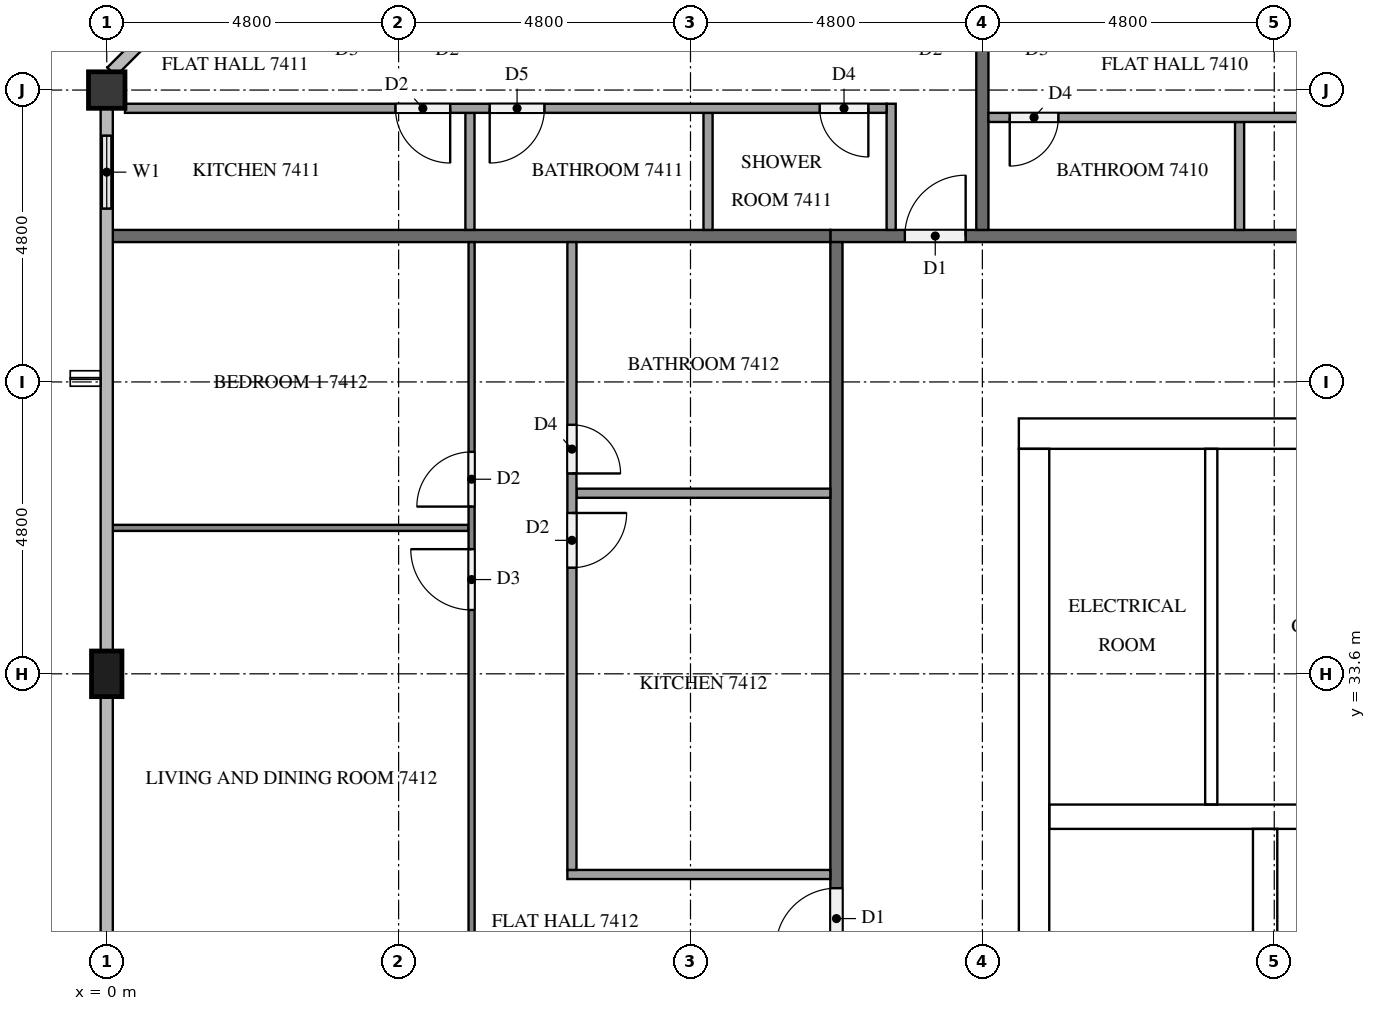
"""IFC4 building model, lengths in metres.
Left out: names, types, materials, properties, quantities, classifications, styles, units other than length and angle.
Written with IfcOpenShell. Run it as: python <this file> out.ifc"""

import sys

from ifc_helpers import new_model, si_unit, direction, frame, frame_2d, origin, origin_2d, place, context, subcontext, project, spatial, rectangle, extrude, element, fill, save


model = new_model("IFC4")
c1 = context("Model", 3, precision=1e-05, world=origin(), true_north=direction((0.0, 1.0)))
c2 = subcontext(c1, "Body", "Model", "MODEL_VIEW")
j1 = project(units=[si_unit("LENGTHUNIT", "METRE"), si_unit("PLANEANGLEUNIT", "RADIAN")], contexts=[c1])
p1 = place(None, origin())
s1 = spatial("IfcSite", under=j1, at=p1, CompositionType="ELEMENT")
p2 = place(p1, origin())
s2 = spatial("IfcBuilding", under=s1, at=p2, CompositionType="ELEMENT")
p3 = place(p2, frame((0.0, 0.0, 282.6)))
s3 = spatial("IfcBuildingStorey", under=s2, at=p3, CompositionType="ELEMENT", Elevation=282.6)
p4 = place(p3, frame((15.0, 37.55, 0.0), z_axis=(0.0, 0.0, 1.0), x_axis=(1.0, 0.0, 0.0)))
e1 = element("IfcWall", 1, at=p4, inside=s3, PredefinedType="SHEAR", context=c2, shape_type="SweptSolid", body=[
    extrude(rectangle(XDim=32.4, YDim=0.5, at=frame_2d((16.2, 0.0))), origin(), (0.0, 0.0, 1.0), 3.2),
])
p5 = place(p4, frame((15.3, 0.0, 0.0)))
e2 = element("IfcOpeningElement", 2, at=p5, cuts=e1, PredefinedType="OPENING", context=c2, shape_type="SweptSolid", body=[
    extrude(rectangle(XDim=1.8, YDim=2.1, at=frame_2d((0.9, 1.05))), frame((0.0, 0.26, 0.0), z_axis=(0.0, -1.0, 0.0), x_axis=(1.0, 0.0, 0.0)), (0.0, 0.0, 1.0), 0.52),
])
p6 = place(p4, frame((1.282, 0.0, 0.0)))
e3 = element("IfcOpeningElement", 3, at=p6, cuts=e1, PredefinedType="OPENING", context=c2, shape_type="SweptSolid", body=[
    extrude(rectangle(XDim=1.0, YDim=2.1, at=frame_2d((0.5, 1.05))), frame((0.0, 0.26, 0.0), z_axis=(0.0, -1.0, 0.0), x_axis=(1.0, 0.0, 0.0)), (0.0, 0.0, 1.0), 0.52),
])
p7 = place(p4, frame((5.082, 0.0, 0.0)))
e4 = element("IfcOpeningElement", 4, at=p7, cuts=e1, PredefinedType="OPENING", context=c2, shape_type="SweptSolid", body=[
    extrude(rectangle(XDim=1.0, YDim=2.1, at=frame_2d((0.5, 1.05))), frame((0.0, 0.26, 0.0), z_axis=(0.0, -1.0, 0.0), x_axis=(1.0, 0.0, 0.0)), (0.0, 0.0, 1.0), 0.52),
])
p8 = place(p3, frame((15.25, 15.5, 0.0), z_axis=(0.0, 0.0, 1.0), x_axis=(0.0, 1.0, 0.0)))
e5 = element("IfcWall", 5, at=p8, inside=s3, PredefinedType="SHEAR", context=c2, shape_type="SweptSolid", body=[
    extrude(rectangle(XDim=21.8, YDim=0.5, at=frame_2d((10.9, 0.0))), origin(), (0.0, 0.0, 1.0), 3.2),
])
p9 = place(p8, frame((5.26, 0.0, 0.0)))
e6 = element("IfcOpeningElement", 6, at=p9, cuts=e5, PredefinedType="OPENING", context=c2, shape_type="SweptSolid", body=[
    extrude(rectangle(XDim=1.2, YDim=2.1, at=frame_2d((0.6, 1.05))), frame((0.0, 0.26, 0.0), z_axis=(0.0, -1.0, 0.0), x_axis=(1.0, 0.0, 0.0)), (0.0, 0.0, 1.0), 0.52),
])
p10 = place(p3, frame((19.05, 15.5, 0.0), z_axis=(0.0, 0.0, 1.0), x_axis=(0.0, 1.0, 0.0)))
e7 = element("IfcWall", 7, at=p10, inside=s3, PredefinedType="SHEAR", context=c2, shape_type="SweptSolid", body=[
    extrude(rectangle(XDim=15.55, YDim=0.4, at=frame_2d((7.775, 0.0))), origin(), (0.0, 0.0, 1.0), 3.2),
])
p11 = place(p10, frame((9.95, 0.0, 0.0)))
e8 = element("IfcOpeningElement", 8, at=p11, cuts=e7, PredefinedType="OPENING", context=c2, shape_type="SweptSolid", body=[
    extrude(rectangle(XDim=1.1, YDim=2.1, at=frame_2d((0.55, 1.05))), frame((0.0, 0.21, 0.0), z_axis=(0.0, -1.0, 0.0), x_axis=(1.0, 0.0, 0.0)), (0.0, 0.0, 1.0), 0.42),
])
p12 = place(p10, frame((13.45, 0.0, 0.0)))
e9 = element("IfcOpeningElement", 9, at=p12, cuts=e7, PredefinedType="OPENING", context=c2, shape_type="SweptSolid", body=[
    extrude(rectangle(XDim=1.1, YDim=2.1, at=frame_2d((0.55, 1.05))), frame((0.0, 0.21, 0.0), z_axis=(0.0, -1.0, 0.0), x_axis=(1.0, 0.0, 0.0)), (0.0, 0.0, 1.0), 0.42),
])
p13 = place(p10, frame((0.7, 0.0, 0.0)))
e10 = element("IfcOpeningElement", 10, at=p13, cuts=e7, PredefinedType="OPENING", context=c2, shape_type="SweptSolid", body=[
    extrude(rectangle(XDim=1.2, YDim=2.1, at=frame_2d((0.6, 1.05))), frame((0.0, 0.21, 0.0), z_axis=(0.0, -1.0, 0.0), x_axis=(1.0, 0.0, 0.0)), (0.0, 0.0, 1.0), 0.42),
])
p14 = place(p3, frame((15.5, 31.25, 0.0), z_axis=(0.0, 0.0, 1.0), x_axis=(1.0, 0.0, 0.0)))
e11 = element("IfcWall", 11, at=p14, inside=s3, PredefinedType="SHEAR", context=c2, shape_type="SweptSolid", body=[
    extrude(rectangle(XDim=7.4, YDim=0.4, at=frame_2d((3.7, 0.0))), origin(), (0.0, 0.0, 1.0), 3.2),
])
p15 = place(p3, frame((0.0, 43.2, 0.0), z_axis=(0.0, 0.0, 1.0), x_axis=(1.0, 0.0, 0.0)))
e12 = element("IfcColumn", 12, at=p15, inside=s3, PredefinedType="COLUMN", context=c2, shape_type="SweptSolid", body=[
    extrude(rectangle(XDim=0.6, YDim=0.6, at=origin_2d()), origin(), (0.0, 0.0, 1.0), 3.2),
])
p16 = place(p3, frame((0.0, 33.6, 0.0), z_axis=(0.0, 0.0, 1.0), x_axis=(0.0, 1.0, 0.0)))
e13 = element("IfcColumn", 13, at=p16, inside=s3, PredefinedType="COLUMN", context=c2, shape_type="SweptSolid", body=[
    extrude(rectangle(XDim=0.75, YDim=0.5, at=origin_2d()), origin(), (0.0, 0.0, 1.0), 3.2),
])
p17 = place(p3, frame((0.0, 42.9, 0.0), z_axis=(0.0, 0.0, 1.0), x_axis=(0.0, -1.0, 0.0)))
e14 = element("IfcWall", 14, at=p17, inside=s3, PredefinedType="SOLIDWALL", context=c2, shape_type="SweptSolid", body=[
    extrude(rectangle(XDim=2.1, YDim=0.15, at=frame_2d((1.05, 0.0))), origin(), (0.0, 0.0, 1.0), 3.2),
])
p18 = place(p17, frame((0.45, 0.0, 0.9)))
e15 = element("IfcOpeningElement", 15, at=p18, cuts=e14, PredefinedType="OPENING", context=c2, shape_type="SweptSolid", body=[
    extrude(rectangle(XDim=1.2, YDim=1.4, at=frame_2d((0.6, 0.7))), frame((0.0, 0.085, 0.0), z_axis=(0.0, -1.0, 0.0), x_axis=(1.0, 0.0, 0.0)), (0.0, 0.0, 1.0), 0.17),
])
p19 = place(p3, frame((18.164, 31.45, 0.0), z_axis=(0.0, 0.0, 1.0), x_axis=(0.0, 1.0, 0.0)))
e16 = element("IfcWall", 16, at=p19, inside=s3, PredefinedType="PARTITIONING", context=c2, shape_type="SweptSolid", body=[
    extrude(rectangle(XDim=5.85, YDim=0.2, at=frame_2d((2.925, 0.0))), origin(), (0.0, 0.0, 1.0), 3.2),
])
p20 = place(p3, frame((11.9, 40.8, 0.0), z_axis=(0.0, 0.0, 1.0), x_axis=(1.0, 0.0, 0.0)))
e17 = element("IfcWall", 17, at=p20, inside=s3, PredefinedType="PARTITIONING", context=c2, shape_type="SweptSolid", body=[
    extrude(rectangle(XDim=38.6, YDim=0.2, at=frame_2d((19.3, 0.0))), origin(), (0.0, 0.0, 1.0), 3.2),
])
p21 = place(p20, frame((33.975, 0.0, 0.0)))
e18 = element("IfcOpeningElement", 18, at=p21, cuts=e17, PredefinedType="OPENING", context=c2, shape_type="SweptSolid", body=[
    extrude(rectangle(XDim=1.0, YDim=2.1, at=frame_2d((0.5, 1.05))), frame((0.0, 0.11, 0.0), z_axis=(0.0, -1.0, 0.0), x_axis=(1.0, 0.0, 0.0)), (0.0, 0.0, 1.0), 0.22),
])
p22 = place(p20, frame((14.725, 0.0, 0.0)))
e19 = element("IfcOpeningElement", 19, at=p22, cuts=e17, PredefinedType="OPENING", context=c2, shape_type="SweptSolid", body=[
    extrude(rectangle(XDim=1.1, YDim=2.1, at=frame_2d((0.55, 1.05))), frame((0.0, 0.11, 0.0), z_axis=(0.0, -1.0, 0.0), x_axis=(1.0, 0.0, 0.0)), (0.0, 0.0, 1.0), 0.22),
])
p23 = place(p20, frame((13.225, 0.0, 0.0)))
e20 = element("IfcOpeningElement", 20, at=p23, cuts=e17, PredefinedType="OPENING", context=c2, shape_type="SweptSolid", body=[
    extrude(rectangle(XDim=1.0, YDim=2.1, at=frame_2d((0.5, 1.05))), frame((0.0, 0.11, 0.0), z_axis=(0.0, -1.0, 0.0), x_axis=(1.0, 0.0, 0.0)), (0.0, 0.0, 1.0), 0.22),
])
p24 = place(p20, frame((1.225, 0.0, 0.0)))
e21 = element("IfcOpeningElement", 21, at=p24, cuts=e17, PredefinedType="OPENING", context=c2, shape_type="SweptSolid", body=[
    extrude(rectangle(XDim=1.0, YDim=2.1, at=frame_2d((0.5, 1.05))), frame((0.0, 0.11, 0.0), z_axis=(0.0, -1.0, 0.0), x_axis=(1.0, 0.0, 0.0)), (0.0, 0.0, 1.0), 0.22),
])
p25 = place(p3, frame((12.0, 12.1, 0.0), z_axis=(0.0, 0.0, 1.0), x_axis=(0.0, 1.0, 0.0)))
e22 = element("IfcWall", 22, at=p25, inside=s3, PredefinedType="PARTITIONING", context=c2, shape_type="SweptSolid", body=[
    extrude(rectangle(XDim=28.6, YDim=0.2, at=frame_2d((14.3, 0.0))), origin(), (0.0, 0.0, 1.0), 3.2),
])
p26 = place(p25, frame((16.975, 0.0, 0.0)))
e23 = element("IfcOpeningElement", 23, at=p26, cuts=e22, PredefinedType="OPENING", context=c2, shape_type="SweptSolid", body=[
    extrude(rectangle(XDim=1.0, YDim=2.1, at=frame_2d((0.5, 1.05))), frame((0.0, 0.11, 0.0), z_axis=(0.0, -1.0, 0.0), x_axis=(1.0, 0.0, 0.0)), (0.0, 0.0, 1.0), 0.22),
])
p27 = place(p25, frame((0.175, 0.0, 0.0)))
e24 = element("IfcOpeningElement", 24, at=p27, cuts=e22, PredefinedType="OPENING", context=c2, shape_type="SweptSolid", body=[
    extrude(rectangle(XDim=1.0, YDim=2.1, at=frame_2d((0.5, 1.05))), frame((0.0, 0.11, 0.0), z_axis=(0.0, -1.0, 0.0), x_axis=(1.0, 0.0, 0.0)), (0.0, 0.0, 1.0), 0.22),
])
p28 = place(p3, frame((14.4, 47.75, 0.0), z_axis=(0.0, 0.0, 1.0), x_axis=(0.0, -1.0, 0.0)))
e25 = element("IfcWall", 25, at=p28, inside=s3, PredefinedType="PARTITIONING", context=c2, shape_type="SweptSolid", body=[
    extrude(rectangle(XDim=6.85, YDim=0.2, at=frame_2d((3.425, 0.0))), origin(), (0.0, 0.0, 1.0), 3.2),
])
p29 = place(p3, frame((0.1, 40.8, 0.0), z_axis=(0.0, 0.0, 1.0), x_axis=(1.0, 0.0, 0.0)))
e26 = element("IfcWall", 26, at=p29, inside=s3, PredefinedType="PARTITIONING", context=c2, shape_type="SweptSolid", body=[
    extrude(rectangle(XDim=11.8, YDim=0.2, at=frame_2d((5.9, 0.0))), origin(), (0.0, 0.0, 1.0), 3.2),
])
p30 = place(p3, frame((18.63, 40.9, 0.0), z_axis=(0.0, 0.0, 1.0), x_axis=(0.0, 1.0, 0.0)))
e27 = element("IfcWall", 27, at=p30, inside=s3, PredefinedType="PARTITIONING", context=c2, shape_type="SweptSolid", body=[
    extrude(rectangle(XDim=1.775, YDim=0.15, at=frame_2d((0.888, 0.0))), origin(), (0.0, 0.0, 1.0), 3.2),
])
p31 = place(p3, frame((24.825, 42.75, 0.0), z_axis=(0.0, 0.0, 1.0), x_axis=(-1.0, 0.0, 0.0)))
e28 = element("IfcWall", 28, at=p31, inside=s3, PredefinedType="PARTITIONING", context=c2, shape_type="SweptSolid", body=[
    extrude(rectangle(XDim=10.325, YDim=0.15, at=frame_2d((5.163, 0.0))), origin(), (0.0, 0.0, 1.0), 3.2),
])
p32 = place(p31, frame((0.3, 0.0, 0.0)))
e29 = element("IfcOpeningElement", 29, at=p32, cuts=e28, PredefinedType="OPENING", context=c2, shape_type="SweptSolid", body=[
    extrude(rectangle(XDim=0.9, YDim=2.1, at=frame_2d((0.45, 1.05))), frame((0.0, 0.085, 0.0), z_axis=(0.0, -1.0, 0.0), x_axis=(1.0, 0.0, 0.0)), (0.0, 0.0, 1.0), 0.17),
])
p33 = place(p31, frame((9.175, 0.0, 0.0)))
e30 = element("IfcOpeningElement", 30, at=p33, cuts=e28, PredefinedType="OPENING", context=c2, shape_type="SweptSolid", body=[
    extrude(rectangle(XDim=0.8, YDim=2.1, at=frame_2d((0.4, 1.05))), frame((0.0, 0.085, 0.0), z_axis=(0.0, -1.0, 0.0), x_axis=(1.0, 0.0, 0.0)), (0.0, 0.0, 1.0), 0.17),
])
for number, where, z_axis, x_axis in (
    (31, (9.888, 40.9, 0.0), (0.0, 0.0, 1.0), (0.0, 1.0, 0.0)),
    (32, (5.973, 40.9, 0.0), (0.0, 0.0, 1.0), (0.0, 1.0, 0.0)),
):
    element("IfcWall", number, at=place(p3, frame(where, z_axis=z_axis, x_axis=x_axis)), inside=s3, PredefinedType="PARTITIONING", context=c2, shape_type="SweptSolid", body=[
        extrude(rectangle(XDim=1.925, YDim=0.15, at=frame_2d((0.962, 0.0))), origin(), (0.0, 0.0, 1.0), 3.2),
    ])
p34 = place(p3, frame((12.9, 40.9, 0.0), z_axis=(0.0, 0.0, 1.0), x_axis=(0.0, 1.0, 0.0)))
e33 = element("IfcWall", 33, at=p34, inside=s3, PredefinedType="PARTITIONING", context=c2, shape_type="SweptSolid", body=[
    extrude(rectangle(XDim=2.075, YDim=0.15, at=frame_2d((1.038, 0.0))), origin(), (0.0, 0.0, 1.0), 3.2),
])
p35 = place(p3, frame((12.825, 42.9, 0.0), z_axis=(0.0, 0.0, 1.0), x_axis=(-1.0, 0.0, 0.0)))
e34 = element("IfcWall", 34, at=p35, inside=s3, PredefinedType="PARTITIONING", context=c2, shape_type="SweptSolid", body=[
    extrude(rectangle(XDim=12.525, YDim=0.15, at=frame_2d((6.262, 0.0))), origin(), (0.0, 0.0, 1.0), 3.2),
])
p36 = place(p35, frame((0.3, 0.0, 0.0)))
e35 = element("IfcOpeningElement", 35, at=p36, cuts=e34, PredefinedType="OPENING", context=c2, shape_type="SweptSolid", body=[
    extrude(rectangle(XDim=0.8, YDim=2.1, at=frame_2d((0.4, 1.05))), frame((0.0, 0.085, 0.0), z_axis=(0.0, -1.0, 0.0), x_axis=(1.0, 0.0, 0.0)), (0.0, 0.0, 1.0), 0.17),
])
p37 = place(p35, frame((5.627, 0.0, 0.0)))
e36 = element("IfcOpeningElement", 36, at=p37, cuts=e34, PredefinedType="OPENING", context=c2, shape_type="SweptSolid", body=[
    extrude(rectangle(XDim=0.9, YDim=2.1, at=frame_2d((0.45, 1.05))), frame((0.0, 0.085, 0.0), z_axis=(0.0, -1.0, 0.0), x_axis=(1.0, 0.0, 0.0)), (0.0, 0.0, 1.0), 0.17),
])
p38 = place(p35, frame((7.177, 0.0, 0.0)))
e37 = element("IfcOpeningElement", 37, at=p38, cuts=e34, PredefinedType="OPENING", context=c2, shape_type="SweptSolid", body=[
    extrude(rectangle(XDim=0.9, YDim=2.1, at=frame_2d((0.45, 1.05))), frame((0.0, 0.085, 0.0), z_axis=(0.0, -1.0, 0.0), x_axis=(1.0, 0.0, 0.0)), (0.0, 0.0, 1.0), 0.17),
])
p39 = place(p3, frame((5.95, 36.0, 0.0), z_axis=(0.0, 0.0, 1.0), x_axis=(-1.0, 0.0, 0.0)))
e38 = element("IfcWall", 38, at=p39, inside=s3, PredefinedType="PARTITIONING", context=c2, shape_type="SweptSolid", body=[
    extrude(rectangle(XDim=5.85, YDim=0.1, at=frame_2d((2.925, 0.0))), origin(), (0.0, 0.0, 1.0), 3.2),
])
p40 = place(p3, frame((6.0, 28.9, 0.0), z_axis=(0.0, 0.0, 1.0), x_axis=(0.0, 1.0, 0.0)))
e39 = element("IfcWall", 39, at=p40, inside=s3, PredefinedType="PARTITIONING", context=c2, shape_type="SweptSolid", body=[
    extrude(rectangle(XDim=11.8, YDim=0.1, at=frame_2d((5.9, 0.0))), origin(), (0.0, 0.0, 1.0), 3.2),
])
p41 = place(p40, frame((5.75, 0.0, 0.0)))
e40 = element("IfcOpeningElement", 40, at=p41, cuts=e39, PredefinedType="OPENING", context=c2, shape_type="SweptSolid", body=[
    extrude(rectangle(XDim=1.0, YDim=2.1, at=frame_2d((0.5, 1.05))), frame((0.0, 0.06, 0.0), z_axis=(0.0, -1.0, 0.0), x_axis=(1.0, 0.0, 0.0)), (0.0, 0.0, 1.0), 0.12),
])
p42 = place(p40, frame((7.45, 0.0, 0.0)))
e41 = element("IfcOpeningElement", 41, at=p42, cuts=e39, PredefinedType="OPENING", context=c2, shape_type="SweptSolid", body=[
    extrude(rectangle(XDim=0.9, YDim=2.1, at=frame_2d((0.45, 1.05))), frame((0.0, 0.06, 0.0), z_axis=(0.0, -1.0, 0.0), x_axis=(1.0, 0.0, 0.0)), (0.0, 0.0, 1.0), 0.12),
])
p43 = place(p3, frame((11.9, 36.57, 0.0), z_axis=(0.0, 0.0, 1.0), x_axis=(-1.0, 0.0, 0.0)))
e42 = element("IfcWall", 42, at=p43, inside=s3, PredefinedType="PARTITIONING", context=c2, shape_type="SweptSolid", body=[
    extrude(rectangle(XDim=4.175, YDim=0.15, at=frame_2d((2.087, 0.0))), origin(), (0.0, 0.0, 1.0), 3.2),
])
p44 = place(p3, frame((11.9, 30.3, 0.0), z_axis=(0.0, 0.0, 1.0), x_axis=(-1.0, 0.0, 0.0)))
e43 = element("IfcWall", 43, at=p44, inside=s3, PredefinedType="PARTITIONING", context=c2, shape_type="SweptSolid", body=[
    extrude(rectangle(XDim=4.325, YDim=0.15, at=frame_2d((2.163, 0.0))), origin(), (0.0, 0.0, 1.0), 3.2),
])
p45 = place(p3, frame((7.65, 40.7, 0.0), z_axis=(0.0, 0.0, 1.0), x_axis=(0.0, -1.0, 0.0)))
e44 = element("IfcWall", 44, at=p45, inside=s3, PredefinedType="PARTITIONING", context=c2, shape_type="SweptSolid", body=[
    extrude(rectangle(XDim=10.325, YDim=0.15, at=frame_2d((5.163, 0.0))), origin(), (0.0, 0.0, 1.0), 3.2),
])
p46 = place(p45, frame((4.455, 0.0, 0.0)))
e45 = element("IfcOpeningElement", 45, at=p46, cuts=e44, PredefinedType="OPENING", context=c2, shape_type="SweptSolid", body=[
    extrude(rectangle(XDim=0.9, YDim=2.1, at=frame_2d((0.45, 1.05))), frame((0.0, 0.085, 0.0), z_axis=(0.0, -1.0, 0.0), x_axis=(1.0, 0.0, 0.0)), (0.0, 0.0, 1.0), 0.17),
])
p47 = place(p45, frame((3.005, 0.0, 0.0)))
e46 = element("IfcOpeningElement", 46, at=p47, cuts=e44, PredefinedType="OPENING", context=c2, shape_type="SweptSolid", body=[
    extrude(rectangle(XDim=0.8, YDim=2.1, at=frame_2d((0.4, 1.05))), frame((0.0, 0.085, 0.0), z_axis=(0.0, -1.0, 0.0), x_axis=(1.0, 0.0, 0.0)), (0.0, 0.0, 1.0), 0.17),
])
p48 = place(p18, origin())
e47 = element("IfcWindow", 47, at=p48, inside=s3, PartitioningType="SINGLE_PANEL", PredefinedType="WINDOW", context=c2, shape_type="SweptSolid", body=[
    extrude(rectangle(XDim=1.2, YDim=1.4, at=frame_2d((0.6, 0.7))), frame((0.0, 0.03, 0.0), z_axis=(0.0, -1.0, 0.0), x_axis=(1.0, 0.0, 0.0)), (0.0, 0.0, 1.0), 0.06),
])
fill(e15, e47)
p49 = place(p12, origin())
e48 = element("IfcDoor", 48, at=p49, inside=s3, OperationType="DOUBLE_DOOR_SLIDING", PredefinedType="DOOR", context=c2, shape_type="SweptSolid", body=[
    extrude(rectangle(XDim=1.1, YDim=2.1, at=frame_2d((0.55, 1.05))), frame((0.0, 0.025, 0.0), z_axis=(0.0, -1.0, 0.0), x_axis=(1.0, 0.0, 0.0)), (0.0, 0.0, 1.0), 0.05),
])
fill(e9, e48)
p50 = place(p6, origin())
e49 = element("IfcDoor", 49, at=p50, inside=s3, OperationType="SINGLE_SWING_LEFT", PredefinedType="DOOR", context=c2, shape_type="SweptSolid", body=[
    extrude(rectangle(XDim=1.0, YDim=2.1, at=frame_2d((0.5, 1.05))), frame((0.0, 0.025, 0.0), z_axis=(0.0, -1.0, 0.0), x_axis=(1.0, 0.0, 0.0)), (0.0, 0.0, 1.0), 0.05),
])
fill(e3, e49)
p51 = place(p24, origin())
e50 = element("IfcDoor", 50, at=p51, inside=s3, OperationType="SINGLE_SWING_RIGHT", PredefinedType="DOOR", context=c2, shape_type="SweptSolid", body=[
    extrude(rectangle(XDim=1.0, YDim=2.1, at=frame_2d((0.5, 1.05))), frame((0.0, 0.025, 0.0), z_axis=(0.0, -1.0, 0.0), x_axis=(1.0, 0.0, 0.0)), (0.0, 0.0, 1.0), 0.05),
])
fill(e21, e50)
p52 = place(p26, origin())
e51 = element("IfcDoor", 51, at=p52, inside=s3, OperationType="SINGLE_SWING_LEFT", PredefinedType="DOOR", context=c2, shape_type="SweptSolid", body=[
    extrude(rectangle(XDim=1.0, YDim=2.1, at=frame_2d((0.5, 1.05))), frame((0.0, 0.025, 0.0), z_axis=(0.0, -1.0, 0.0), x_axis=(1.0, 0.0, 0.0)), (0.0, 0.0, 1.0), 0.05),
])
fill(e23, e51)
p53 = place(p33, origin())
e52 = element("IfcDoor", 52, at=p53, inside=s3, OperationType="SINGLE_SWING_RIGHT", PredefinedType="DOOR", context=c2, shape_type="SweptSolid", body=[
    extrude(rectangle(XDim=0.8, YDim=2.1, at=frame_2d((0.4, 1.05))), frame((0.0, 0.025, 0.0), z_axis=(0.0, -1.0, 0.0), x_axis=(1.0, 0.0, 0.0)), (0.0, 0.0, 1.0), 0.05),
])
fill(e30, e52)
p54 = place(p36, origin())
e53 = element("IfcDoor", 53, at=p54, inside=s3, OperationType="SINGLE_SWING_LEFT", PredefinedType="DOOR", context=c2, shape_type="SweptSolid", body=[
    extrude(rectangle(XDim=0.8, YDim=2.1, at=frame_2d((0.4, 1.05))), frame((0.0, 0.025, 0.0), z_axis=(0.0, -1.0, 0.0), x_axis=(1.0, 0.0, 0.0)), (0.0, 0.0, 1.0), 0.05),
])
fill(e35, e53)
p55 = place(p37, origin())
e54 = element("IfcDoor", 54, at=p55, inside=s3, OperationType="SINGLE_SWING_RIGHT", PredefinedType="DOOR", context=c2, shape_type="SweptSolid", body=[
    extrude(rectangle(XDim=0.9, YDim=2.1, at=frame_2d((0.45, 1.05))), frame((0.0, 0.025, 0.0), z_axis=(0.0, -1.0, 0.0), x_axis=(1.0, 0.0, 0.0)), (0.0, 0.0, 1.0), 0.05),
])
fill(e36, e54)
p56 = place(p38, origin())
e55 = element("IfcDoor", 55, at=p56, inside=s3, OperationType="SINGLE_SWING_LEFT", PredefinedType="DOOR", context=c2, shape_type="SweptSolid", body=[
    extrude(rectangle(XDim=0.9, YDim=2.1, at=frame_2d((0.45, 1.05))), frame((0.0, 0.025, 0.0), z_axis=(0.0, -1.0, 0.0), x_axis=(1.0, 0.0, 0.0)), (0.0, 0.0, 1.0), 0.05),
])
fill(e37, e55)
p57 = place(p41, origin())
e56 = element("IfcDoor", 56, at=p57, inside=s3, OperationType="SINGLE_SWING_RIGHT", PredefinedType="DOOR", context=c2, shape_type="SweptSolid", body=[
    extrude(rectangle(XDim=1.0, YDim=2.1, at=frame_2d((0.5, 1.05))), frame((0.0, 0.025, 0.0), z_axis=(0.0, -1.0, 0.0), x_axis=(1.0, 0.0, 0.0)), (0.0, 0.0, 1.0), 0.05),
])
fill(e40, e56)
p58 = place(p42, origin())
e57 = element("IfcDoor", 57, at=p58, inside=s3, OperationType="SINGLE_SWING_LEFT", PredefinedType="DOOR", context=c2, shape_type="SweptSolid", body=[
    extrude(rectangle(XDim=0.9, YDim=2.1, at=frame_2d((0.45, 1.05))), frame((0.0, 0.025, 0.0), z_axis=(0.0, -1.0, 0.0), x_axis=(1.0, 0.0, 0.0)), (0.0, 0.0, 1.0), 0.05),
])
fill(e41, e57)
p59 = place(p46, origin())
e58 = element("IfcDoor", 58, at=p59, inside=s3, OperationType="SINGLE_SWING_LEFT", PredefinedType="DOOR", context=c2, shape_type="SweptSolid", body=[
    extrude(rectangle(XDim=0.9, YDim=2.1, at=frame_2d((0.45, 1.05))), frame((0.0, 0.025, 0.0), z_axis=(0.0, -1.0, 0.0), x_axis=(1.0, 0.0, 0.0)), (0.0, 0.0, 1.0), 0.05),
])
fill(e45, e58)
p60 = place(p47, origin())
e59 = element("IfcDoor", 59, at=p60, inside=s3, OperationType="SINGLE_SWING_RIGHT", PredefinedType="DOOR", context=c2, shape_type="SweptSolid", body=[
    extrude(rectangle(XDim=0.8, YDim=2.1, at=frame_2d((0.4, 1.05))), frame((0.0, 0.025, 0.0), z_axis=(0.0, -1.0, 0.0), x_axis=(1.0, 0.0, 0.0)), (0.0, 0.0, 1.0), 0.05),
])
fill(e46, e59)
save(model, sys.argv[1])
